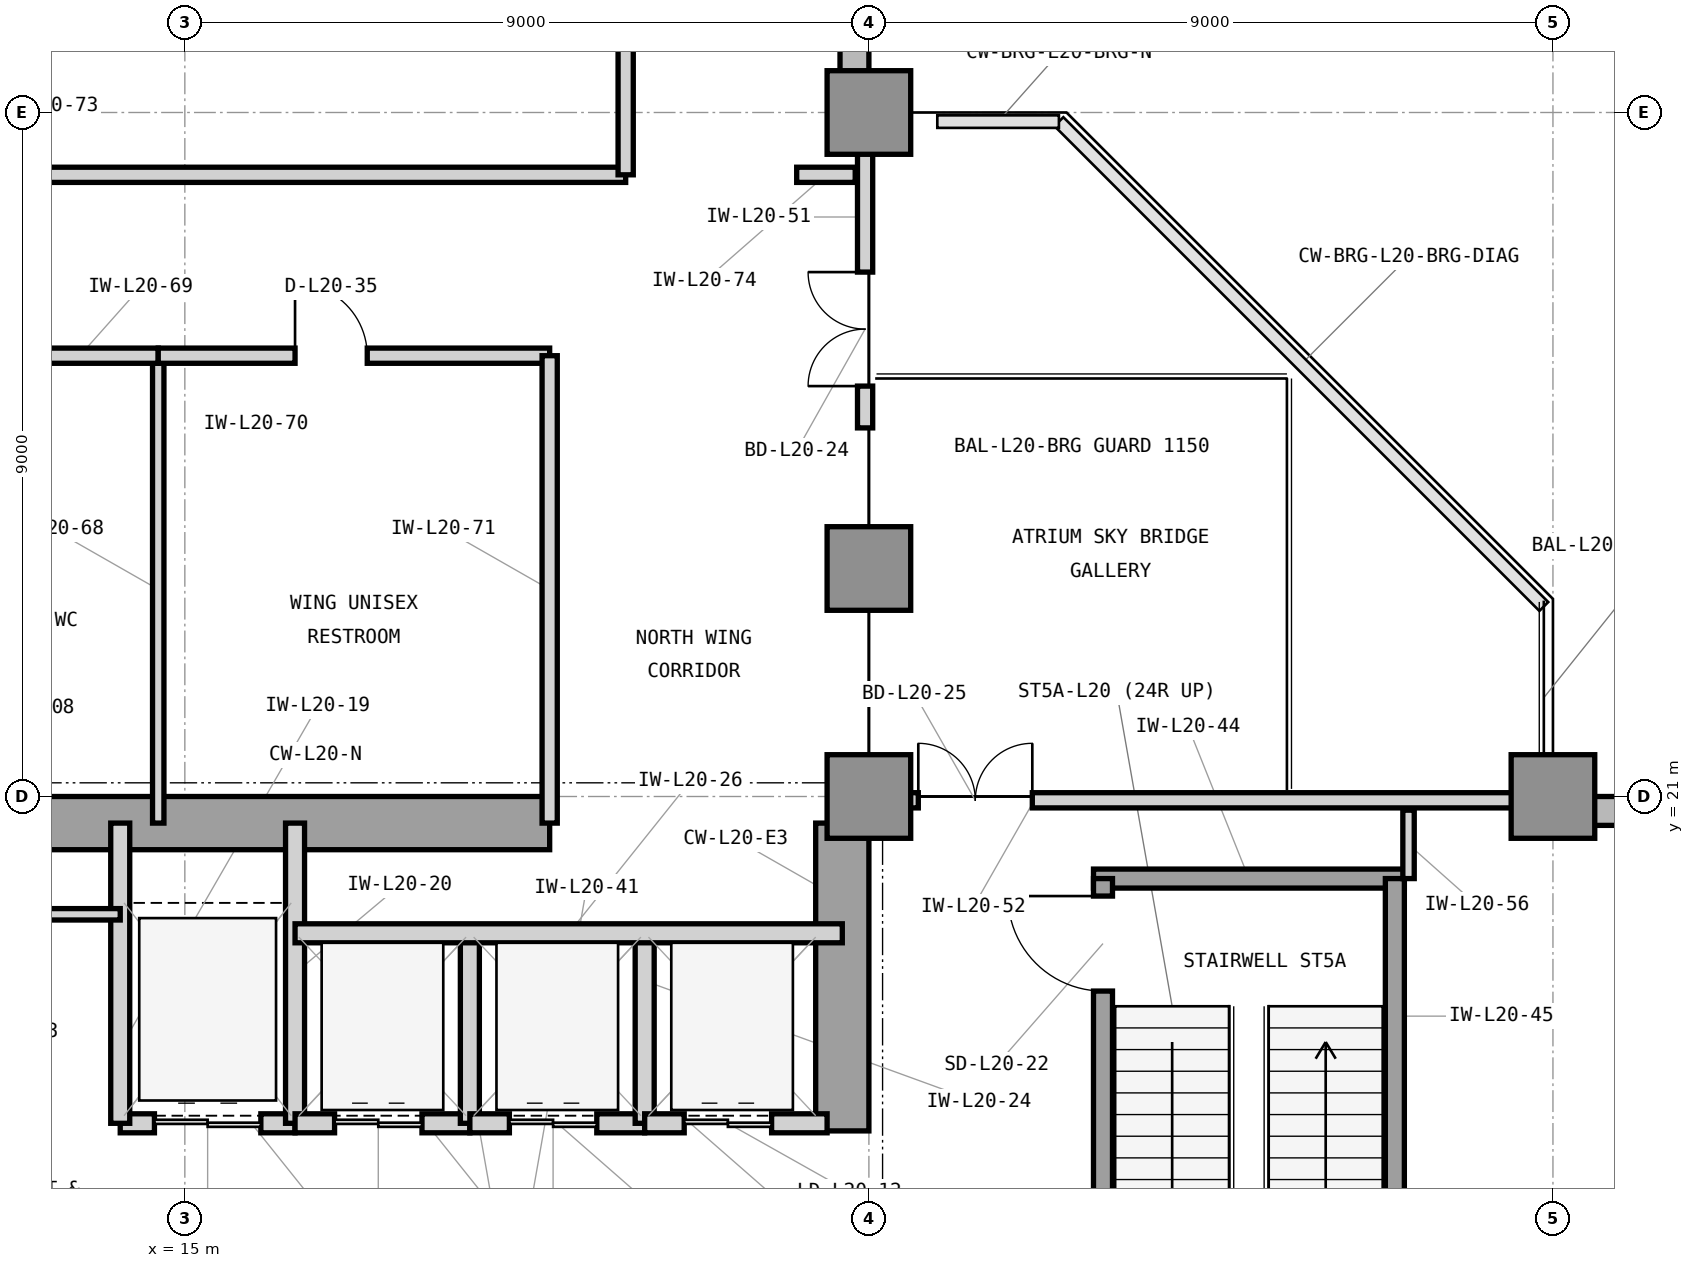
"""IFC4 building model, lengths in metres.
Left out: names, types, materials, properties, quantities, classifications, styles, units other than length and angle.
Written with IfcOpenShell. Run it as: python <this file> out.ifc"""

import sys

from ifc_helpers import new_model, si_unit, direction, frame, frame_2d, origin, origin_2d, place, context, subcontext, project, spatial, rectangle, extrude, element, fill, save


model = new_model("IFC4")
c1 = context("Model", 3, precision=1e-05, world=origin(), true_north=direction((0.0, 1.0)))
c2 = subcontext(c1, "Body", "Model", "MODEL_VIEW")
j1 = project(units=[si_unit("LENGTHUNIT", "METRE"), si_unit("PLANEANGLEUNIT", "RADIAN")], contexts=[c1])
p1 = place(None, origin())
s1 = spatial("IfcSite", under=j1, at=p1, CompositionType="ELEMENT")
p2 = place(p1, origin())
s2 = spatial("IfcBuilding", under=s1, at=p2, CompositionType="ELEMENT")
p3 = place(p2, frame((0.0, 0.0, 89.1)))
s3 = spatial("IfcBuildingStorey", under=s2, at=p3, CompositionType="ELEMENT", Elevation=89.1)
p4 = place(p3, frame((7.475, 20.65, 0.0), z_axis=(0.0, 0.0, 1.0), x_axis=(1.0, 0.0, 0.0)))
e1 = element("IfcWall", 1, at=p4, inside=s3, PredefinedType="SHEAR", context=c2, shape_type="SweptSolid", body=[
    extrude(rectangle(XDim=12.325, YDim=0.7, at=frame_2d((6.163, 0.0))), origin(), (0.0, 0.0, 1.0), 4.2),
])
p5 = place(p3, frame((23.65, 16.6, 0.0), z_axis=(0.0, 0.0, 1.0), x_axis=(0.0, 1.0, 0.0)))
e2 = element("IfcWall", 2, at=p5, inside=s3, PredefinedType="SHEAR", context=c2, shape_type="SweptSolid", body=[
    extrude(rectangle(XDim=4.05, YDim=0.7, at=frame_2d((2.025, 0.0))), origin(), (0.0, 0.0, 1.0), 4.2),
])
for number, where, z_axis, x_axis in (
    (3, (24.0, 21.0, 0.0), (0.0, 0.0, 1.0), (1.0, 0.0, 0.0)),
    (4, (33.0, 21.0, 0.0), (0.0, 0.0, 1.0), (1.0, 0.0, 0.0)),
    (5, (24.0, 24.0, 0.0), (0.0, 0.0, 1.0), (1.0, 0.0, 0.0)),
    (6, (24.0, 30.0, 0.0), (0.0, 0.0, 1.0), (1.0, 0.0, 0.0)),
):
    element("IfcColumn", number, at=place(p3, frame(where, z_axis=z_axis, x_axis=x_axis)), inside=s3, PredefinedType="COLUMN", context=c2, shape_type="SweptSolid", body=[
        extrude(rectangle(XDim=1.1, YDim=1.1, at=origin_2d()), origin(), (0.0, 0.0, 1.0), 4.2),
    ])
p6 = place(p3, frame((61.4, 20.81, 0.0), z_axis=(0.0, 0.0, 1.0), x_axis=(-1.0, 0.0, 0.0)))
e7 = element("IfcWall", 7, at=p6, inside=s3, PredefinedType="STANDARD", context=c2, shape_type="SweptSolid", body=[
    extrude(rectangle(XDim=27.95, YDim=0.38, at=frame_2d((13.975, 0.0))), origin(), (0.0, 0.0, 1.0), 4.0),
])
p7 = place(p6, frame((14.804, 0.0, 0.7)))
e8 = element("IfcOpeningElement", 8, at=p7, cuts=e7, PredefinedType="OPENING", context=c2, shape_type="SweptSolid", body=[
    extrude(rectangle(XDim=3.0, YDim=2.6, at=frame_2d((1.5, 1.3))), frame((0.0, 0.2, 0.0), z_axis=(0.0, -1.0, 0.0), x_axis=(1.0, 0.0, 0.0)), (0.0, 0.0, 1.0), 0.4),
])
p8 = place(p6, frame((24.721, 0.0, 0.85)))
e9 = element("IfcOpeningElement", 9, at=p8, cuts=e7, PredefinedType="OPENING", context=c2, shape_type="SweptSolid", body=[
    extrude(rectangle(XDim=1.8, YDim=2.25, at=frame_2d((0.9, 1.125))), frame((0.0, 0.2, 0.0), z_axis=(0.0, -1.0, 0.0), x_axis=(1.0, 0.0, 0.0)), (0.0, 0.0, 1.0), 0.4),
])
p9 = place(p6, frame((8.254, 0.0, 0.85)))
e10 = element("IfcOpeningElement", 10, at=p9, cuts=e7, PredefinedType="OPENING", context=c2, shape_type="SweptSolid", body=[
    extrude(rectangle(XDim=1.2, YDim=2.25, at=frame_2d((0.6, 1.125))), frame((0.0, 0.2, 0.0), z_axis=(0.0, -1.0, 0.0), x_axis=(1.0, 0.0, 0.0)), (0.0, 0.0, 1.0), 0.4),
])
p10 = place(p3, frame((23.81, 30.45, 0.0), z_axis=(0.0, 0.0, 1.0), x_axis=(0.0, 1.0, 0.0)))
e11 = element("IfcWall", 11, at=p10, inside=s3, PredefinedType="STANDARD", context=c2, shape_type="SweptSolid", body=[
    extrude(rectangle(XDim=15.95, YDim=0.38, at=frame_2d((7.975, 0.0))), origin(), (0.0, 0.0, 1.0), 4.0),
])
p11 = place(p10, frame((1.758, 0.0, 0.85)))
e12 = element("IfcOpeningElement", 12, at=p11, cuts=e11, PredefinedType="OPENING", context=c2, shape_type="SweptSolid", body=[
    extrude(rectangle(XDim=1.8, YDim=2.25, at=frame_2d((0.9, 1.125))), frame((0.0, 0.2, 0.0), z_axis=(0.0, -1.0, 0.0), x_axis=(1.0, 0.0, 0.0)), (0.0, 0.0, 1.0), 0.4),
])
p12 = place(p3, frame((14.15, 16.7, 0.0), z_axis=(0.0, 0.0, 1.0), x_axis=(1.0, 0.0, 0.0)))
e13 = element("IfcWall", 13, at=p12, inside=s3, PredefinedType="PARTITIONING", context=c2, shape_type="SweptSolid", body=[
    extrude(rectangle(XDim=2.3, YDim=0.25, at=frame_2d((1.15, 0.0))), origin(), (0.0, 0.0, 1.0), 3.527),
])
p13 = place(p12, frame((0.45, 0.0, 0.0)))
e14 = element("IfcOpeningElement", 14, at=p13, cuts=e13, PredefinedType="OPENING", context=c2, shape_type="SweptSolid", body=[
    extrude(rectangle(XDim=1.4, YDim=2.35, at=frame_2d((0.7, 1.175))), frame((0.0, 0.135, 0.0), z_axis=(0.0, -1.0, 0.0), x_axis=(1.0, 0.0, 0.0)), (0.0, 0.0, 1.0), 0.27),
])
for number, where, z_axis, x_axis in (
    (15, (14.15, 16.7, 0.0), (0.0, 0.0, 1.0), (0.0, 1.0, 0.0)),
    (16, (16.45, 16.7, 0.0), (0.0, 0.0, 1.0), (0.0, 1.0, 0.0)),
):
    element("IfcWall", number, at=place(p3, frame(where, z_axis=z_axis, x_axis=x_axis)), inside=s3, PredefinedType="PARTITIONING", context=c2, shape_type="SweptSolid", body=[
        extrude(rectangle(XDim=3.95, YDim=0.25, at=frame_2d((1.975, 0.0))), origin(), (0.0, 0.0, 1.0), 3.93),
    ])
p14 = place(p3, frame((16.45, 16.7, 0.0), z_axis=(0.0, 0.0, 1.0), x_axis=(1.0, 0.0, 0.0)))
e17 = element("IfcWall", 17, at=p14, inside=s3, PredefinedType="PARTITIONING", context=c2, shape_type="SweptSolid", body=[
    extrude(rectangle(XDim=2.3, YDim=0.25, at=frame_2d((1.15, 0.0))), origin(), (0.0, 0.0, 1.0), 3.527),
])
p15 = place(p14, frame((0.52, 0.0, 0.0)))
e18 = element("IfcOpeningElement", 18, at=p15, cuts=e17, PredefinedType="OPENING", context=c2, shape_type="SweptSolid", body=[
    extrude(rectangle(XDim=1.15, YDim=2.25, at=frame_2d((0.575, 1.125))), frame((0.0, 0.135, 0.0), z_axis=(0.0, -1.0, 0.0), x_axis=(1.0, 0.0, 0.0)), (0.0, 0.0, 1.0), 0.27),
])
p16 = place(p3, frame((18.75, 16.7, 0.0), z_axis=(0.0, 0.0, 1.0), x_axis=(0.0, 1.0, 0.0)))
e19 = element("IfcWall", 19, at=p16, inside=s3, PredefinedType="PARTITIONING", context=c2, shape_type="SweptSolid", body=[
    extrude(rectangle(XDim=2.5, YDim=0.25, at=frame_2d((1.25, 0.0))), origin(), (0.0, 0.0, 1.0), 3.93),
])
p17 = place(p3, frame((18.75, 16.7, 0.0), z_axis=(0.0, 0.0, 1.0), x_axis=(1.0, 0.0, 0.0)))
e20 = element("IfcWall", 20, at=p17, inside=s3, PredefinedType="PARTITIONING", context=c2, shape_type="SweptSolid", body=[
    extrude(rectangle(XDim=2.3, YDim=0.25, at=frame_2d((1.15, 0.0))), origin(), (0.0, 0.0, 1.0), 3.527),
])
p18 = place(p17, frame((0.52, 0.0, 0.0)))
e21 = element("IfcOpeningElement", 21, at=p18, cuts=e20, PredefinedType="OPENING", context=c2, shape_type="SweptSolid", body=[
    extrude(rectangle(XDim=1.15, YDim=2.25, at=frame_2d((0.575, 1.125))), frame((0.0, 0.135, 0.0), z_axis=(0.0, -1.0, 0.0), x_axis=(1.0, 0.0, 0.0)), (0.0, 0.0, 1.0), 0.27),
])
p19 = place(p3, frame((21.05, 16.7, 0.0), z_axis=(0.0, 0.0, 1.0), x_axis=(0.0, 1.0, 0.0)))
e22 = element("IfcWall", 22, at=p19, inside=s3, PredefinedType="PARTITIONING", context=c2, shape_type="SweptSolid", body=[
    extrude(rectangle(XDim=2.5, YDim=0.25, at=frame_2d((1.25, 0.0))), origin(), (0.0, 0.0, 1.0), 3.93),
])
p20 = place(p3, frame((21.05, 16.7, 0.0), z_axis=(0.0, 0.0, 1.0), x_axis=(1.0, 0.0, 0.0)))
e23 = element("IfcWall", 23, at=p20, inside=s3, PredefinedType="PARTITIONING", context=c2, shape_type="SweptSolid", body=[
    extrude(rectangle(XDim=2.4, YDim=0.25, at=frame_2d((1.2, 0.0))), origin(), (0.0, 0.0, 1.0), 3.527),
])
p21 = place(p20, frame((0.52, 0.0, 0.0)))
e24 = element("IfcOpeningElement", 24, at=p21, cuts=e23, PredefinedType="OPENING", context=c2, shape_type="SweptSolid", body=[
    extrude(rectangle(XDim=1.15, YDim=2.25, at=frame_2d((0.575, 1.125))), frame((0.0, 0.135, 0.0), z_axis=(0.0, -1.0, 0.0), x_axis=(1.0, 0.0, 0.0)), (0.0, 0.0, 1.0), 0.27),
])
p22 = place(p3, frame((16.45, 19.2, 0.0), z_axis=(0.0, 0.0, 1.0), x_axis=(1.0, 0.0, 0.0)))
e25 = element("IfcWall", 25, at=p22, inside=s3, PredefinedType="PARTITIONING", context=c2, shape_type="SweptSolid", body=[
    extrude(rectangle(XDim=7.2, YDim=0.25, at=frame_2d((3.6, 0.0))), origin(), (0.0, 0.0, 1.0), 3.93),
])
p23 = place(p3, frame((10.33, 19.45, 0.0), z_axis=(0.0, 0.0, 1.0), x_axis=(1.0, 0.0, 0.0)))
e26 = element("IfcWall", 26, at=p23, inside=s3, PredefinedType="PARTITIONING", context=c2, shape_type="SweptSolid", body=[
    extrude(rectangle(XDim=3.82, YDim=0.15, at=frame_2d((1.91, 0.0))), origin(), (0.0, 0.0, 1.0), 3.93),
])
p24 = place(p23, frame((1.25, 0.0, 0.0)))
e27 = element("IfcOpeningElement", 27, at=p24, cuts=e26, PredefinedType="OPENING", context=c2, shape_type="SweptSolid", body=[
    extrude(rectangle(XDim=0.95, YDim=2.1, at=frame_2d((0.475, 1.05))), frame((0.0, 0.085, 0.0), z_axis=(0.0, -1.0, 0.0), x_axis=(1.0, 0.0, 0.0)), (0.0, 0.0, 1.0), 0.17),
])
p25 = place(p3, frame((26.955, 19.92, 0.0), z_axis=(0.0, 0.0, 1.0), x_axis=(1.0, 0.0, 0.0)))
e28 = element("IfcWall", 28, at=p25, inside=s3, PredefinedType="SHEAR", context=c2, shape_type="SweptSolid", body=[
    extrude(rectangle(XDim=4.09, YDim=0.25, at=frame_2d((2.045, 0.0))), origin(), (0.0, 0.0, 1.0), 4.2),
])
p26 = place(p3, frame((30.92, 12.68, 0.0), z_axis=(0.0, 0.0, 1.0), x_axis=(0.0, 1.0, 0.0)))
e29 = element("IfcWall", 29, at=p26, inside=s3, PredefinedType="SHEAR", context=c2, shape_type="SweptSolid", body=[
    extrude(rectangle(XDim=7.24, YDim=0.25, at=frame_2d((3.62, 0.0))), origin(), (0.0, 0.0, 1.0), 4.2),
])
p27 = place(p3, frame((27.08, 12.68, 0.0), z_axis=(0.0, 0.0, 1.0), x_axis=(0.0, 1.0, 0.0)))
e30 = element("IfcWall", 30, at=p27, inside=s3, PredefinedType="SHEAR", context=c2, shape_type="SweptSolid", body=[
    extrude(rectangle(XDim=7.24, YDim=0.25, at=frame_2d((3.62, 0.0))), origin(), (0.0, 0.0, 1.0), 4.2),
])
p28 = place(p27, frame((5.76, 0.0, 0.0)))
e31 = element("IfcOpeningElement", 31, at=p28, cuts=e30, PredefinedType="OPENING", context=c2, shape_type="SweptSolid", body=[
    extrude(rectangle(XDim=1.25, YDim=2.2, at=frame_2d((0.625, 1.1))), frame((0.0, 0.135, 0.0), z_axis=(0.0, -1.0, 0.0), x_axis=(1.0, 0.0, 0.0)), (0.0, 0.0, 1.0), 0.27),
])
p29 = place(p3, frame((23.95, 25.85, 0.0), z_axis=(0.0, 0.0, 1.0), x_axis=(0.0, 1.0, 0.0)))
e32 = element("IfcWall", 32, at=p29, inside=s3, PredefinedType="PARTITIONING", context=c2, shape_type="SweptSolid", body=[
    extrude(rectangle(XDim=3.7, YDim=0.2, at=frame_2d((1.85, 0.0))), origin(), (0.0, 0.0, 1.0), 3.313),
])
p30 = place(p29, frame((0.55, 0.0, 0.0)))
e33 = element("IfcOpeningElement", 33, at=p30, cuts=e32, PredefinedType="OPENING", context=c2, shape_type="SweptSolid", body=[
    extrude(rectangle(XDim=1.5, YDim=2.3, at=frame_2d((0.75, 1.15))), frame((0.0, 0.11, 0.0), z_axis=(0.0, -1.0, 0.0), x_axis=(1.0, 0.0, 0.0)), (0.0, 0.0, 1.0), 0.22),
])
p31 = place(p3, frame((24.05, 20.95, 0.0), z_axis=(0.0, 0.0, 1.0), x_axis=(1.0, 0.0, 0.0)))
e34 = element("IfcWall", 34, at=p31, inside=s3, PredefinedType="PARTITIONING", context=c2, shape_type="SweptSolid", body=[
    extrude(rectangle(XDim=8.5, YDim=0.2, at=frame_2d((4.25, 0.0))), origin(), (0.0, 0.0, 1.0), 3.313),
])
p32 = place(p31, frame((0.6, 0.0, 0.0)))
e35 = element("IfcOpeningElement", 35, at=p32, cuts=e34, PredefinedType="OPENING", context=c2, shape_type="SweptSolid", body=[
    extrude(rectangle(XDim=1.5, YDim=2.3, at=frame_2d((0.75, 1.15))), frame((0.0, 0.11, 0.0), z_axis=(0.0, -1.0, 0.0), x_axis=(1.0, 0.0, 0.0)), (0.0, 0.0, 1.0), 0.22),
])
p33 = place(p3, frame((31.1, 19.92, 0.0), z_axis=(0.0, 0.0, 1.0), x_axis=(0.0, 1.0, 0.0)))
e36 = element("IfcWall", 36, at=p33, inside=s3, PredefinedType="PARTITIONING", context=c2, shape_type="SweptSolid", body=[
    extrude(rectangle(XDim=0.9, YDim=0.15, at=frame_2d((0.45, 0.0))), origin(), (0.0, 0.0, 1.0), 3.93),
])
p34 = place(p3, frame((14.65, 20.65, 0.0), z_axis=(0.0, 0.0, 1.0), x_axis=(0.0, 1.0, 0.0)))
e37 = element("IfcWall", 37, at=p34, inside=s3, PredefinedType="PARTITIONING", context=c2, shape_type="SweptSolid", body=[
    extrude(rectangle(XDim=6.15, YDim=0.15, at=frame_2d((3.075, 0.0))), origin(), (0.0, 0.0, 1.0), 3.93),
])
p35 = place(p3, frame((10.52, 26.8, 0.0), z_axis=(0.0, 0.0, 1.0), x_axis=(1.0, 0.0, 0.0)))
e38 = element("IfcWall", 38, at=p35, inside=s3, PredefinedType="PARTITIONING", context=c2, shape_type="SweptSolid", body=[
    extrude(rectangle(XDim=4.13, YDim=0.2, at=frame_2d((2.065, 0.0))), origin(), (0.0, 0.0, 1.0), 3.93),
])
p36 = place(p35, frame((1.5, 0.0, 0.0)))
e39 = element("IfcOpeningElement", 39, at=p36, cuts=e38, PredefinedType="OPENING", context=c2, shape_type="SweptSolid", body=[
    extrude(rectangle(XDim=0.95, YDim=2.1, at=frame_2d((0.475, 1.05))), frame((0.0, 0.11, 0.0), z_axis=(0.0, -1.0, 0.0), x_axis=(1.0, 0.0, 0.0)), (0.0, 0.0, 1.0), 0.22),
])
p37 = place(p3, frame((14.65, 26.8, 0.0), z_axis=(0.0, 0.0, 1.0), x_axis=(1.0, 0.0, 0.0)))
e40 = element("IfcWall", 40, at=p37, inside=s3, PredefinedType="PARTITIONING", context=c2, shape_type="SweptSolid", body=[
    extrude(rectangle(XDim=5.15, YDim=0.2, at=frame_2d((2.575, 0.0))), origin(), (0.0, 0.0, 1.0), 3.93),
])
p38 = place(p37, frame((1.8, 0.0, 0.0)))
e41 = element("IfcOpeningElement", 41, at=p38, cuts=e40, PredefinedType="OPENING", context=c2, shape_type="SweptSolid", body=[
    extrude(rectangle(XDim=0.95, YDim=2.1, at=frame_2d((0.475, 1.05))), frame((0.0, 0.11, 0.0), z_axis=(0.0, -1.0, 0.0), x_axis=(1.0, 0.0, 0.0)), (0.0, 0.0, 1.0), 0.22),
])
p39 = place(p3, frame((19.8, 20.65, 0.0), z_axis=(0.0, 0.0, 1.0), x_axis=(0.0, 1.0, 0.0)))
e42 = element("IfcWall", 42, at=p39, inside=s3, PredefinedType="PARTITIONING", context=c2, shape_type="SweptSolid", body=[
    extrude(rectangle(XDim=6.15, YDim=0.2, at=frame_2d((3.075, 0.0))), origin(), (0.0, 0.0, 1.0), 3.93),
])
p40 = place(p3, frame((10.63, 29.18, 0.0), z_axis=(0.0, 0.0, 1.0), x_axis=(1.0, 0.0, 0.0)))
e43 = element("IfcWall", 43, at=p40, inside=s3, PredefinedType="PARTITIONING", context=c2, shape_type="SweptSolid", body=[
    extrude(rectangle(XDim=10.17, YDim=0.2, at=frame_2d((5.085, 0.0))), origin(), (0.0, 0.0, 1.0), 3.93),
])
p41 = place(p3, frame((23.05, 29.18, 0.0), z_axis=(0.0, 0.0, 1.0), x_axis=(1.0, 0.0, 0.0)))
e44 = element("IfcWall", 44, at=p41, inside=s3, PredefinedType="PARTITIONING", context=c2, shape_type="SweptSolid", body=[
    extrude(rectangle(XDim=0.77, YDim=0.2, at=frame_2d((0.385, 0.0))), origin(), (0.0, 0.0, 1.0), 3.93),
])
p42 = place(p3, frame((20.8, 29.18, 0.0), z_axis=(0.0, 0.0, 1.0), x_axis=(0.0, 1.0, 0.0)))
e45 = element("IfcWall", 45, at=p42, inside=s3, PredefinedType="PARTITIONING", context=c2, shape_type="SweptSolid", body=[
    extrude(rectangle(XDim=7.44, YDim=0.2, at=frame_2d((3.72, 0.0))), origin(), (0.0, 0.0, 1.0), 3.93),
])
p43 = place(p42, frame((3.22, 0.0, 0.0)))
e46 = element("IfcOpeningElement", 46, at=p43, cuts=e45, PredefinedType="OPENING", context=c2, shape_type="SweptSolid", body=[
    extrude(rectangle(XDim=1.0, YDim=2.15, at=frame_2d((0.5, 1.075))), frame((0.0, 0.11, 0.0), z_axis=(0.0, -1.0, 0.0), x_axis=(1.0, 0.0, 0.0)), (0.0, 0.0, 1.0), 0.22),
])
p44 = place(p13, origin())
e47 = element("IfcDoor", 47, at=p44, inside=s3, OperationType="DOUBLE_DOOR_SLIDING", PredefinedType="DOOR", context=c2, shape_type="SweptSolid", body=[
    extrude(rectangle(XDim=1.4, YDim=2.35, at=frame_2d((0.7, 1.175))), frame((0.0, 0.025, 0.0), z_axis=(0.0, -1.0, 0.0), x_axis=(1.0, 0.0, 0.0)), (0.0, 0.0, 1.0), 0.05),
])
fill(e14, e47)
p45 = place(p15, origin())
e48 = element("IfcDoor", 48, at=p45, inside=s3, OperationType="DOUBLE_DOOR_SLIDING", PredefinedType="DOOR", context=c2, shape_type="SweptSolid", body=[
    extrude(rectangle(XDim=1.15, YDim=2.25, at=frame_2d((0.575, 1.125))), frame((0.0, 0.025, 0.0), z_axis=(0.0, -1.0, 0.0), x_axis=(1.0, 0.0, 0.0)), (0.0, 0.0, 1.0), 0.05),
])
fill(e18, e48)
p46 = place(p18, origin())
e49 = element("IfcDoor", 49, at=p46, inside=s3, OperationType="DOUBLE_DOOR_SLIDING", PredefinedType="DOOR", context=c2, shape_type="SweptSolid", body=[
    extrude(rectangle(XDim=1.15, YDim=2.25, at=frame_2d((0.575, 1.125))), frame((0.0, 0.025, 0.0), z_axis=(0.0, -1.0, 0.0), x_axis=(1.0, 0.0, 0.0)), (0.0, 0.0, 1.0), 0.05),
])
fill(e21, e49)
p47 = place(p21, origin())
e50 = element("IfcDoor", 50, at=p47, inside=s3, OperationType="DOUBLE_DOOR_SLIDING", PredefinedType="DOOR", context=c2, shape_type="SweptSolid", body=[
    extrude(rectangle(XDim=1.15, YDim=2.25, at=frame_2d((0.575, 1.125))), frame((0.0, 0.025, 0.0), z_axis=(0.0, -1.0, 0.0), x_axis=(1.0, 0.0, 0.0)), (0.0, 0.0, 1.0), 0.05),
])
fill(e24, e50)
p48 = place(p28, origin())
e51 = element("IfcDoor", 51, at=p48, inside=s3, OperationType="SINGLE_SWING_RIGHT", PredefinedType="DOOR", context=c2, shape_type="SweptSolid", body=[
    extrude(rectangle(XDim=1.25, YDim=2.2, at=frame_2d((0.625, 1.1))), frame((0.0, 0.025, 0.0), z_axis=(0.0, -1.0, 0.0), x_axis=(1.0, 0.0, 0.0)), (0.0, 0.0, 1.0), 0.05),
])
fill(e31, e51)
p49 = place(p30, origin())
e52 = element("IfcDoor", 52, at=p49, inside=s3, OperationType="DOUBLE_DOOR_SINGLE_SWING", PredefinedType="DOOR", context=c2, shape_type="SweptSolid", body=[
    extrude(rectangle(XDim=1.5, YDim=2.3, at=frame_2d((0.75, 1.15))), frame((0.0, 0.025, 0.0), z_axis=(0.0, -1.0, 0.0), x_axis=(1.0, 0.0, 0.0)), (0.0, 0.0, 1.0), 0.05),
])
fill(e33, e52)
p50 = place(p32, origin())
e53 = element("IfcDoor", 53, at=p50, inside=s3, OperationType="DOUBLE_DOOR_SINGLE_SWING", PredefinedType="DOOR", context=c2, shape_type="SweptSolid", body=[
    extrude(rectangle(XDim=1.5, YDim=2.3, at=frame_2d((0.75, 1.15))), frame((0.0, 0.025, 0.0), z_axis=(0.0, -1.0, 0.0), x_axis=(1.0, 0.0, 0.0)), (0.0, 0.0, 1.0), 0.05),
])
fill(e35, e53)
p51 = place(p38, origin())
e54 = element("IfcDoor", 54, at=p51, inside=s3, OperationType="SINGLE_SWING_LEFT", PredefinedType="DOOR", context=c2, shape_type="SweptSolid", body=[
    extrude(rectangle(XDim=0.95, YDim=2.1, at=frame_2d((0.475, 1.05))), frame((0.0, 0.025, 0.0), z_axis=(0.0, -1.0, 0.0), x_axis=(1.0, 0.0, 0.0)), (0.0, 0.0, 1.0), 0.05),
])
fill(e41, e54)
save(model, sys.argv[1])
